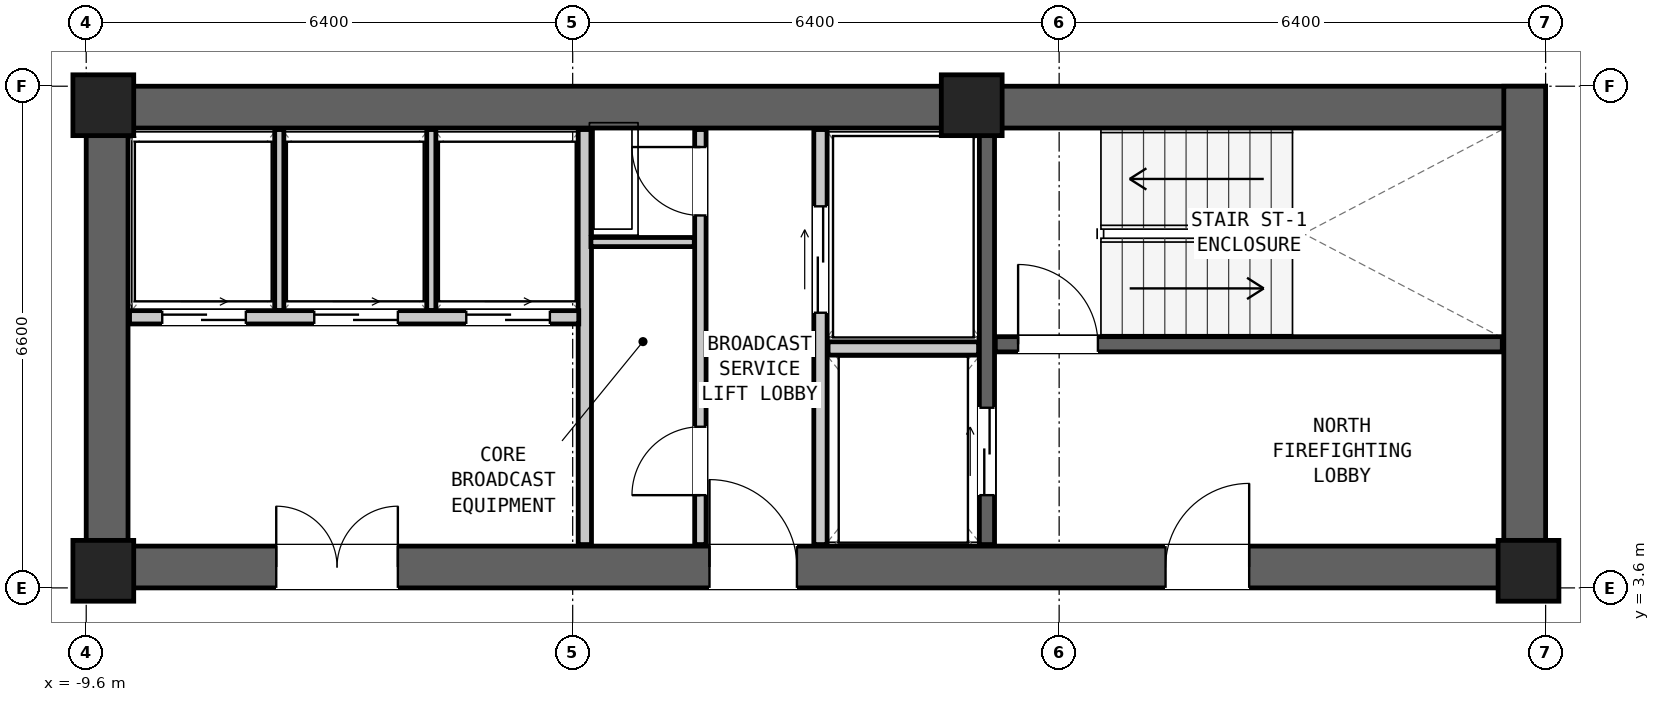
"""IFC4 building model, lengths in metres.
Left out: names, types, materials, properties, quantities, classifications, styles, units other than length and angle.
Written with IfcOpenShell. Run it as: python <this file> out.ifc"""

import sys

from ifc_helpers import new_model, si_unit, direction, frame, frame_2d, origin, origin_2d, place, context, subcontext, project, spatial, rectangle, extrude, element, fill, save


model = new_model("IFC4")
c1 = context("Model", 3, precision=1e-05, world=origin(), true_north=direction((0.0, 1.0)))
c2 = subcontext(c1, "Body", "Model", "MODEL_VIEW")
j1 = project(units=[si_unit("LENGTHUNIT", "METRE"), si_unit("PLANEANGLEUNIT", "RADIAN")], contexts=[c1])
p1 = place(None, origin())
s1 = spatial("IfcSite", under=j1, at=p1, CompositionType="ELEMENT")
p2 = place(p1, origin())
s2 = spatial("IfcBuilding", under=s1, at=p2, CompositionType="ELEMENT")
p3 = place(p2, frame((0.0, 0.0, 61.5)))
s3 = spatial("IfcBuildingStorey", under=s2, at=p3, CompositionType="ELEMENT", Elevation=61.5)
p4 = place(p3, frame((-9.6, 9.925, 0.0), z_axis=(0.0, 0.0, 1.0), x_axis=(1.0, 0.0, 0.0)))
e1 = element("IfcWall", 1, at=p4, inside=s3, PredefinedType="SHEAR", context=c2, shape_type="SweptSolid", body=[
    extrude(rectangle(XDim=19.2, YDim=0.55, at=frame_2d((9.6, 0.0))), origin(), (0.0, 0.0, 1.0), 3.6),
])
p5 = place(p3, frame((-9.6, 3.875, 0.0), z_axis=(0.0, 0.0, 1.0), x_axis=(1.0, 0.0, 0.0)))
e2 = element("IfcWall", 2, at=p5, inside=s3, PredefinedType="SHEAR", context=c2, shape_type="SweptSolid", body=[
    extrude(rectangle(XDim=19.2, YDim=0.55, at=frame_2d((9.6, 0.0))), origin(), (0.0, 0.0, 1.0), 3.6),
])
p6 = place(p5, frame((14.2, 0.0, 0.0)))
e3 = element("IfcOpeningElement", 3, at=p6, cuts=e2, PredefinedType="OPENING", context=c2, shape_type="SweptSolid", body=[
    extrude(rectangle(XDim=1.1, YDim=2.08, at=frame_2d((0.55, 1.04))), frame((0.0, 0.287, 0.0), z_axis=(0.0, -1.0, 0.0), x_axis=(1.0, 0.0, 0.0)), (0.0, 0.0, 1.0), 0.574),
])
p7 = place(p5, frame((8.2, 0.0, 0.0)))
e4 = element("IfcOpeningElement", 4, at=p7, cuts=e2, PredefinedType="OPENING", context=c2, shape_type="SweptSolid", body=[
    extrude(rectangle(XDim=1.15, YDim=2.1, at=frame_2d((0.575, 1.05))), frame((0.0, 0.287, 0.0), z_axis=(0.0, -1.0, 0.0), x_axis=(1.0, 0.0, 0.0)), (0.0, 0.0, 1.0), 0.574),
])
p8 = place(p5, frame((2.5, 0.0, 0.0)))
e5 = element("IfcOpeningElement", 5, at=p8, cuts=e2, PredefinedType="OPENING", context=c2, shape_type="SweptSolid", body=[
    extrude(rectangle(XDim=1.6, YDim=2.12, at=frame_2d((0.8, 1.06))), frame((0.0, 0.287, 0.0), z_axis=(0.0, -1.0, 0.0), x_axis=(1.0, 0.0, 0.0)), (0.0, 0.0, 1.0), 0.574),
])
for number, where, z_axis, x_axis in (
    (6, (-9.325, 3.6, 0.0), (0.0, 0.0, 1.0), (0.0, 1.0, 0.0)),
    (7, (9.325, 3.6, 0.0), (0.0, 0.0, 1.0), (0.0, 1.0, 0.0)),
):
    element("IfcWall", number, at=place(p3, frame(where, z_axis=z_axis, x_axis=x_axis)), inside=s3, PredefinedType="SHEAR", context=c2, shape_type="SweptSolid", body=[
        extrude(rectangle(XDim=6.6, YDim=0.55, at=frame_2d((3.3, 0.0))), origin(), (0.0, 0.0, 1.0), 3.6),
    ])
for number, where, z_axis, x_axis in (
    (8, (-9.375, 9.95, 0.0), (0.0, 0.0, 1.0), (1.0, 0.0, 0.0)),
    (9, (2.05, 9.95, 0.0), (0.0, 0.0, 1.0), (1.0, 0.0, 0.0)),
    (10, (-9.375, 3.825, 0.0), (0.0, 0.0, 1.0), (1.0, 0.0, 0.0)),
    (11, (9.375, 3.825, 0.0), (0.0, 0.0, 1.0), (1.0, 0.0, 0.0)),
):
    element("IfcColumn", number, at=place(p3, frame(where, z_axis=z_axis, x_axis=x_axis)), inside=s3, PredefinedType="COLUMN", context=c2, shape_type="SweptSolid", body=[
        extrude(rectangle(XDim=0.8, YDim=0.8, at=origin_2d()), origin(), (0.0, 0.0, 1.0), 3.6),
    ])
p9 = place(p3, frame((2.36, 6.805, 0.0), z_axis=(0.0, 0.0, 1.0), x_axis=(1.0, 0.0, 0.0)))
e12 = element("IfcWall", 12, at=p9, inside=s3, PredefinedType="SHEAR", context=c2, shape_type="SweptSolid", body=[
    extrude(rectangle(XDim=6.67, YDim=0.2, at=frame_2d((3.335, 0.0))), origin(), (0.0, 0.0, 1.0), 3.22),
])
p10 = place(p9, frame((0.3, 0.0, 0.0)))
e13 = element("IfcOpeningElement", 13, at=p10, cuts=e12, PredefinedType="OPENING", context=c2, shape_type="SweptSolid", body=[
    extrude(rectangle(XDim=1.05, YDim=2.08, at=frame_2d((0.525, 1.04))), frame((0.0, 0.112, 0.0), z_axis=(0.0, -1.0, 0.0), x_axis=(1.0, 0.0, 0.0)), (0.0, 0.0, 1.0), 0.224),
])
p11 = place(p3, frame((2.25, 4.17, 0.0), z_axis=(0.0, 0.0, 1.0), x_axis=(0.0, 1.0, 0.0)))
e14 = element("IfcWall", 14, at=p11, inside=s3, PredefinedType="SHEAR", context=c2, shape_type="SweptSolid", body=[
    extrude(rectangle(XDim=5.46, YDim=0.2, at=frame_2d((2.73, 0.0))), origin(), (0.0, 0.0, 1.0), 3.22),
])
p12 = place(p11, frame((0.65, 0.0, 0.0)))
e15 = element("IfcOpeningElement", 15, at=p12, cuts=e14, PredefinedType="OPENING", context=c2, shape_type="SweptSolid", body=[
    extrude(rectangle(XDim=1.15, YDim=2.08, at=frame_2d((0.575, 1.04))), frame((0.0, 0.112, 0.0), z_axis=(0.0, -1.0, 0.0), x_axis=(1.0, 0.0, 0.0)), (0.0, 0.0, 1.0), 0.224),
])
p13 = place(p3, frame((0.06, 4.17, 0.0), z_axis=(0.0, 0.0, 1.0), x_axis=(0.0, 1.0, 0.0)))
e16 = element("IfcWall", 16, at=p13, inside=s3, PredefinedType="PARTITIONING", context=c2, shape_type="SweptSolid", body=[
    extrude(rectangle(XDim=5.46, YDim=0.175, at=frame_2d((2.73, 0.0))), origin(), (0.0, 0.0, 1.0), 3.22),
])
p14 = place(p13, frame((3.05, 0.0, 0.0)))
e17 = element("IfcOpeningElement", 17, at=p14, cuts=e16, PredefinedType="OPENING", context=c2, shape_type="SweptSolid", body=[
    extrude(rectangle(XDim=1.4, YDim=2.12, at=frame_2d((0.7, 1.06))), frame((0.0, 0.1, 0.0), z_axis=(0.0, -1.0, 0.0), x_axis=(1.0, 0.0, 0.0)), (0.0, 0.0, 1.0), 0.199),
])
p15 = place(p3, frame((0.16, 6.75, 0.0), z_axis=(0.0, 0.0, 1.0), x_axis=(1.0, 0.0, 0.0)))
e18 = element("IfcWall", 18, at=p15, inside=s3, PredefinedType="PARTITIONING", context=c2, shape_type="SweptSolid", body=[
    extrude(rectangle(XDim=1.98, YDim=0.175, at=frame_2d((0.99, 0.0))), origin(), (0.0, 0.0, 1.0), 3.22),
])
p16 = place(p3, frame((-3.04, 4.17, 0.0), z_axis=(0.0, 0.0, 1.0), x_axis=(0.0, 1.0, 0.0)))
e19 = element("IfcWall", 19, at=p16, inside=s3, PredefinedType="PARTITIONING", context=c2, shape_type="SweptSolid", body=[
    extrude(rectangle(XDim=5.46, YDim=0.175, at=frame_2d((2.73, 0.0))), origin(), (0.0, 0.0, 1.0), 3.22),
])
p17 = place(p3, frame((-1.52, 4.17, 0.0), z_axis=(0.0, 0.0, 1.0), x_axis=(0.0, 1.0, 0.0)))
e20 = element("IfcWall", 20, at=p17, inside=s3, PredefinedType="PARTITIONING", context=c2, shape_type="SweptSolid", body=[
    extrude(rectangle(XDim=5.46, YDim=0.15, at=frame_2d((2.73, 0.0))), origin(), (0.0, 0.0, 1.0), 3.22),
])
p18 = place(p17, frame((4.33, 0.0, 0.0)))
e21 = element("IfcOpeningElement", 21, at=p18, cuts=e20, PredefinedType="OPENING", context=c2, shape_type="SweptSolid", body=[
    extrude(rectangle(XDim=0.9, YDim=2.05, at=frame_2d((0.45, 1.025))), frame((0.0, 0.087, 0.0), z_axis=(0.0, -1.0, 0.0), x_axis=(1.0, 0.0, 0.0)), (0.0, 0.0, 1.0), 0.174),
])
p19 = place(p17, frame((0.65, 0.0, 0.0)))
e22 = element("IfcOpeningElement", 22, at=p19, cuts=e20, PredefinedType="OPENING", context=c2, shape_type="SweptSolid", body=[
    extrude(rectangle(XDim=0.9, YDim=2.05, at=frame_2d((0.45, 1.025))), frame((0.0, 0.087, 0.0), z_axis=(0.0, -1.0, 0.0), x_axis=(1.0, 0.0, 0.0)), (0.0, 0.0, 1.0), 0.174),
])
p20 = place(p3, frame((-2.96, 8.15, 0.0), z_axis=(0.0, 0.0, 1.0), x_axis=(1.0, 0.0, 0.0)))
e23 = element("IfcWall", 23, at=p20, inside=s3, PredefinedType="PARTITIONING", context=c2, shape_type="SweptSolid", body=[
    extrude(rectangle(XDim=1.36, YDim=0.12, at=frame_2d((0.68, 0.0))), origin(), (0.0, 0.0, 1.0), 3.22),
])
p21 = place(p3, frame((-9.03, 7.16, 0.0), z_axis=(0.0, 0.0, 1.0), x_axis=(1.0, 0.0, 0.0)))
e24 = element("IfcWall", 24, at=p21, inside=s3, PredefinedType="PARTITIONING", context=c2, shape_type="SweptSolid", body=[
    extrude(rectangle(XDim=5.91, YDim=0.175, at=frame_2d((2.955, 0.0))), origin(), (0.0, 0.0, 1.0), 3.22),
])
p22 = place(p21, frame((0.43, 0.0, 0.0)))
e25 = element("IfcOpeningElement", 25, at=p22, cuts=e24, PredefinedType="OPENING", context=c2, shape_type="SweptSolid", body=[
    extrude(rectangle(XDim=1.1, YDim=2.06, at=frame_2d((0.55, 1.03))), frame((0.0, 0.1, 0.0), z_axis=(0.0, -1.0, 0.0), x_axis=(1.0, 0.0, 0.0)), (0.0, 0.0, 1.0), 0.199),
])
p23 = place(p21, frame((2.43, 0.0, 0.0)))
e26 = element("IfcOpeningElement", 26, at=p23, cuts=e24, PredefinedType="OPENING", context=c2, shape_type="SweptSolid", body=[
    extrude(rectangle(XDim=1.1, YDim=2.06, at=frame_2d((0.55, 1.03))), frame((0.0, 0.1, 0.0), z_axis=(0.0, -1.0, 0.0), x_axis=(1.0, 0.0, 0.0)), (0.0, 0.0, 1.0), 0.199),
])
p24 = place(p21, frame((4.43, 0.0, 0.0)))
e27 = element("IfcOpeningElement", 27, at=p24, cuts=e24, PredefinedType="OPENING", context=c2, shape_type="SweptSolid", body=[
    extrude(rectangle(XDim=1.1, YDim=2.06, at=frame_2d((0.55, 1.03))), frame((0.0, 0.1, 0.0), z_axis=(0.0, -1.0, 0.0), x_axis=(1.0, 0.0, 0.0)), (0.0, 0.0, 1.0), 0.199),
])
for number, where, z_axis, x_axis in (
    (28, (-7.06, 7.25, 0.0), (0.0, 0.0, 1.0), (0.0, 1.0, 0.0)),
    (29, (-5.06, 7.25, 0.0), (0.0, 0.0, 1.0), (0.0, 1.0, 0.0)),
):
    element("IfcWall", number, at=place(p3, frame(where, z_axis=z_axis, x_axis=x_axis)), inside=s3, PredefinedType="PARTITIONING", context=c2, shape_type="SweptSolid", body=[
        extrude(rectangle(XDim=2.38, YDim=0.12, at=frame_2d((1.19, 0.0))), origin(), (0.0, 0.0, 1.0), 3.22),
    ])
p25 = place(p10, origin())
e30 = element("IfcDoor", 30, at=p25, inside=s3, OperationType="SINGLE_SWING_LEFT", PredefinedType="DOOR", context=c2, shape_type="SweptSolid", body=[
    extrude(rectangle(XDim=1.05, YDim=2.08, at=frame_2d((0.525, 1.04))), frame((0.0, 0.025, 0.0), z_axis=(0.0, -1.0, 0.0), x_axis=(1.0, 0.0, 0.0)), (0.0, 0.0, 1.0), 0.05),
])
fill(e13, e30)
p26 = place(p6, origin())
e31 = element("IfcDoor", 31, at=p26, inside=s3, OperationType="SINGLE_SWING_RIGHT", PredefinedType="DOOR", context=c2, shape_type="SweptSolid", body=[
    extrude(rectangle(XDim=1.1, YDim=2.08, at=frame_2d((0.55, 1.04))), frame((0.0, 0.025, 0.0), z_axis=(0.0, -1.0, 0.0), x_axis=(1.0, 0.0, 0.0)), (0.0, 0.0, 1.0), 0.05),
])
fill(e3, e31)
p27 = place(p12, origin())
e32 = element("IfcDoor", 32, at=p27, inside=s3, OperationType="DOUBLE_DOOR_SLIDING", PredefinedType="DOOR", context=c2, shape_type="SweptSolid", body=[
    extrude(rectangle(XDim=1.15, YDim=2.08, at=frame_2d((0.575, 1.04))), frame((0.0, 0.025, 0.0), z_axis=(0.0, -1.0, 0.0), x_axis=(1.0, 0.0, 0.0)), (0.0, 0.0, 1.0), 0.05),
])
fill(e15, e32)
p28 = place(p14, origin())
e33 = element("IfcDoor", 33, at=p28, inside=s3, OperationType="DOUBLE_DOOR_SLIDING", PredefinedType="DOOR", context=c2, shape_type="SweptSolid", body=[
    extrude(rectangle(XDim=1.4, YDim=2.12, at=frame_2d((0.7, 1.06))), frame((0.0, 0.025, 0.0), z_axis=(0.0, -1.0, 0.0), x_axis=(1.0, 0.0, 0.0)), (0.0, 0.0, 1.0), 0.05),
])
fill(e17, e33)
p29 = place(p7, origin())
e34 = element("IfcDoor", 34, at=p29, inside=s3, OperationType="SINGLE_SWING_LEFT", PredefinedType="DOOR", context=c2, shape_type="SweptSolid", body=[
    extrude(rectangle(XDim=1.15, YDim=2.1, at=frame_2d((0.575, 1.05))), frame((0.0, 0.025, 0.0), z_axis=(0.0, -1.0, 0.0), x_axis=(1.0, 0.0, 0.0)), (0.0, 0.0, 1.0), 0.05),
])
fill(e4, e34)
p30 = place(p18, origin())
e35 = element("IfcDoor", 35, at=p30, inside=s3, OperationType="SINGLE_SWING_RIGHT", PredefinedType="DOOR", context=c2, shape_type="SweptSolid", body=[
    extrude(rectangle(XDim=0.9, YDim=2.05, at=frame_2d((0.45, 1.025))), frame((0.0, 0.025, 0.0), z_axis=(0.0, -1.0, 0.0), x_axis=(1.0, 0.0, 0.0)), (0.0, 0.0, 1.0), 0.05),
])
fill(e21, e35)
p31 = place(p19, origin())
e36 = element("IfcDoor", 36, at=p31, inside=s3, OperationType="SINGLE_SWING_LEFT", PredefinedType="DOOR", context=c2, shape_type="SweptSolid", body=[
    extrude(rectangle(XDim=0.9, YDim=2.05, at=frame_2d((0.45, 1.025))), frame((0.0, 0.025, 0.0), z_axis=(0.0, -1.0, 0.0), x_axis=(1.0, 0.0, 0.0)), (0.0, 0.0, 1.0), 0.05),
])
fill(e22, e36)
p32 = place(p22, origin())
e37 = element("IfcDoor", 37, at=p32, inside=s3, OperationType="DOUBLE_DOOR_SLIDING", PredefinedType="DOOR", context=c2, shape_type="SweptSolid", body=[
    extrude(rectangle(XDim=1.1, YDim=2.06, at=frame_2d((0.55, 1.03))), frame((0.0, 0.025, 0.0), z_axis=(0.0, -1.0, 0.0), x_axis=(1.0, 0.0, 0.0)), (0.0, 0.0, 1.0), 0.05),
])
fill(e25, e37)
p33 = place(p23, origin())
e38 = element("IfcDoor", 38, at=p33, inside=s3, OperationType="DOUBLE_DOOR_SLIDING", PredefinedType="DOOR", context=c2, shape_type="SweptSolid", body=[
    extrude(rectangle(XDim=1.1, YDim=2.06, at=frame_2d((0.55, 1.03))), frame((0.0, 0.025, 0.0), z_axis=(0.0, -1.0, 0.0), x_axis=(1.0, 0.0, 0.0)), (0.0, 0.0, 1.0), 0.05),
])
fill(e26, e38)
p34 = place(p24, origin())
e39 = element("IfcDoor", 39, at=p34, inside=s3, OperationType="DOUBLE_DOOR_SLIDING", PredefinedType="DOOR", context=c2, shape_type="SweptSolid", body=[
    extrude(rectangle(XDim=1.1, YDim=2.06, at=frame_2d((0.55, 1.03))), frame((0.0, 0.025, 0.0), z_axis=(0.0, -1.0, 0.0), x_axis=(1.0, 0.0, 0.0)), (0.0, 0.0, 1.0), 0.05),
])
fill(e27, e39)
p35 = place(p8, origin())
e40 = element("IfcDoor", 40, at=p35, inside=s3, OperationType="DOUBLE_DOOR_SINGLE_SWING", PredefinedType="DOOR", context=c2, shape_type="SweptSolid", body=[
    extrude(rectangle(XDim=1.6, YDim=2.12, at=frame_2d((0.8, 1.06))), frame((0.0, 0.025, 0.0), z_axis=(0.0, -1.0, 0.0), x_axis=(1.0, 0.0, 0.0)), (0.0, 0.0, 1.0), 0.05),
])
fill(e5, e40)
save(model, sys.argv[1])
